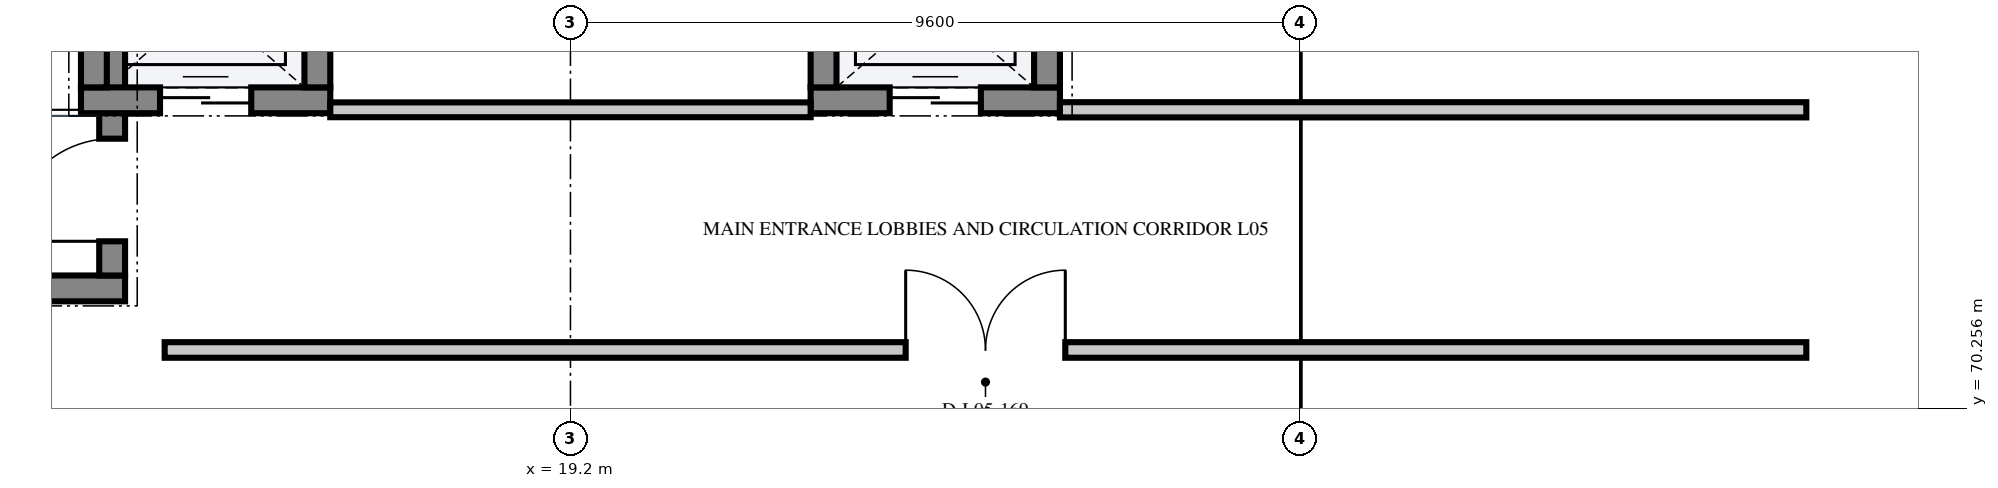
"""IFC4 building model, lengths in metres.
Left out: names, types, materials, properties, quantities, classifications, styles, units other than length and angle.
Written with IfcOpenShell. Run it as: python <this file> out.ifc"""

import sys

from ifc_helpers import new_model, si_unit, direction, frame, frame_2d, origin, place, context, subcontext, project, spatial, rectangle, extrude, element, fill, save


model = new_model("IFC4")
c1 = context("Model", 3, precision=1e-05, world=origin(), true_north=direction((0.0, 1.0)))
c2 = subcontext(c1, "Body", "Model", "MODEL_VIEW")
j1 = project(units=[si_unit("LENGTHUNIT", "METRE"), si_unit("PLANEANGLEUNIT", "RADIAN")], contexts=[c1])
p1 = place(None, origin())
s1 = spatial("IfcSite", under=j1, at=p1, CompositionType="ELEMENT")
p2 = place(p1, origin())
s2 = spatial("IfcBuilding", under=s1, at=p2, CompositionType="ELEMENT")
p3 = place(p2, frame((0.0, 0.0, 24.6)))
s3 = spatial("IfcBuildingStorey", under=s2, at=p3, CompositionType="ELEMENT", Elevation=24.6)
p4 = place(p3, frame((8.16, 71.83, 0.0), z_axis=(0.0, 0.0, 1.0), x_axis=(1.0, 0.0, 0.0)))
e1 = element("IfcWall", 1, at=p4, inside=s3, PredefinedType="SHEAR", context=c2, shape_type="SweptSolid", body=[
    extrude(rectangle(XDim=5.18, YDim=0.34, at=frame_2d((2.59, 0.0))), origin(), (0.0, 0.0, 1.0), 4.51),
])
p5 = place(p3, frame((13.17, 72.0, 0.0), z_axis=(0.0, 0.0, 1.0), x_axis=(0.0, 1.0, 0.0)))
e2 = element("IfcWall", 2, at=p5, inside=s3, PredefinedType="SHEAR", context=c2, shape_type="SweptSolid", body=[
    extrude(rectangle(XDim=8.8, YDim=0.34, at=frame_2d((4.4, 0.0))), origin(), (0.0, 0.0, 1.0), 4.51),
])
p6 = place(p5, frame((0.45, 0.0, 0.0)))
e3 = element("IfcOpeningElement", 3, at=p6, cuts=e2, PredefinedType="OPENING", context=c2, shape_type="SweptSolid", body=[
    extrude(rectangle(XDim=1.35, YDim=2.2, at=frame_2d((0.675, 1.1))), frame((0.0, 0.182, 0.0), z_axis=(0.0, -1.0, 0.0), x_axis=(1.0, 0.0, 0.0)), (0.0, 0.0, 1.0), 0.364),
])
p7 = place(p3, frame((12.76, 74.305, 0.0), z_axis=(0.0, 0.0, 1.0), x_axis=(1.0, 0.0, 0.0)))
e4 = element("IfcWall", 4, at=p7, inside=s3, PredefinedType="SHEAR", context=c2, shape_type="SweptSolid", body=[
    extrude(rectangle(XDim=3.28, YDim=0.34, at=frame_2d((1.64, 0.0))), origin(), (0.0, 0.0, 1.0), 4.51),
])
p8 = place(p7, frame((1.04, 0.0, 0.0)))
e5 = element("IfcOpeningElement", 5, at=p8, cuts=e4, PredefinedType="OPENING", context=c2, shape_type="SweptSolid", body=[
    extrude(rectangle(XDim=1.2, YDim=2.2, at=frame_2d((0.6, 1.1))), frame((0.0, 0.182, 0.0), z_axis=(0.0, -1.0, 0.0), x_axis=(1.0, 0.0, 0.0)), (0.0, 0.0, 1.0), 0.364),
])
for number, where, z_axis, x_axis in (
    (6, (12.93, 74.475, 0.0), (0.0, 0.0, 1.0), (0.0, 1.0, 0.0)),
    (7, (15.87, 74.475, 0.0), (0.0, 0.0, 1.0), (0.0, 1.0, 0.0)),
):
    element("IfcWall", number, at=place(p3, frame(where, z_axis=z_axis, x_axis=x_axis)), inside=s3, PredefinedType="SHEAR", context=c2, shape_type="SweptSolid", body=[
        extrude(rectangle(XDim=2.25, YDim=0.34, at=frame_2d((1.125, 0.0))), origin(), (0.0, 0.0, 1.0), 4.51),
    ])
p9 = place(p3, frame((22.36, 74.305, 0.0), z_axis=(0.0, 0.0, 1.0), x_axis=(1.0, 0.0, 0.0)))
e8 = element("IfcWall", 8, at=p9, inside=s3, PredefinedType="SHEAR", context=c2, shape_type="SweptSolid", body=[
    extrude(rectangle(XDim=3.28, YDim=0.34, at=frame_2d((1.64, 0.0))), origin(), (0.0, 0.0, 1.0), 4.51),
])
p10 = place(p9, frame((1.04, 0.0, 0.0)))
e9 = element("IfcOpeningElement", 9, at=p10, cuts=e8, PredefinedType="OPENING", context=c2, shape_type="SweptSolid", body=[
    extrude(rectangle(XDim=1.2, YDim=2.2, at=frame_2d((0.6, 1.1))), frame((0.0, 0.182, 0.0), z_axis=(0.0, -1.0, 0.0), x_axis=(1.0, 0.0, 0.0)), (0.0, 0.0, 1.0), 0.364),
])
for number, where, z_axis, x_axis in (
    (10, (22.53, 74.475, 0.0), (0.0, 0.0, 1.0), (0.0, 1.0, 0.0)),
    (11, (25.47, 74.475, 0.0), (0.0, 0.0, 1.0), (0.0, 1.0, 0.0)),
):
    element("IfcWall", number, at=place(p3, frame(where, z_axis=z_axis, x_axis=x_axis)), inside=s3, PredefinedType="SHEAR", context=c2, shape_type="SweptSolid", body=[
        extrude(rectangle(XDim=2.25, YDim=0.34, at=frame_2d((1.125, 0.0))), origin(), (0.0, 0.0, 1.0), 4.51),
    ])
p11 = place(p3, frame((13.861, 71.02, 0.0), z_axis=(0.0, 0.0, 1.0), x_axis=(1.0, 0.0, 0.0)))
e12 = element("IfcWall", 12, at=p11, inside=s3, PredefinedType="PARTITIONING", context=c2, shape_type="SweptSolid", body=[
    extrude(rectangle(XDim=21.599, YDim=0.205, at=frame_2d((10.799, 0.0))), origin(), (0.0, 0.0, 1.0), 4.51),
])
p12 = place(p11, frame((9.75, 0.0, 0.0)))
e13 = element("IfcOpeningElement", 13, at=p12, cuts=e12, PredefinedType="OPENING", context=c2, shape_type="SweptSolid", body=[
    extrude(rectangle(XDim=2.1, YDim=2.42, at=frame_2d((1.05, 1.21))), frame((0.0, 0.115, 0.0), z_axis=(0.0, -1.0, 0.0), x_axis=(1.0, 0.0, 0.0)), (0.0, 0.0, 1.0), 0.229),
])
p13 = place(p3, frame((35.46, 74.18, 0.0), z_axis=(0.0, 0.0, 1.0), x_axis=(-1.0, 0.0, 0.0)))
e14 = element("IfcWall", 14, at=p13, inside=s3, PredefinedType="PARTITIONING", context=c2, shape_type="SweptSolid", body=[
    extrude(rectangle(XDim=9.82, YDim=0.2, at=frame_2d((4.91, 0.0))), origin(), (0.0, 0.0, 1.0), 4.51),
])
p14 = place(p3, frame((22.36, 74.18, 0.0), z_axis=(0.0, 0.0, 1.0), x_axis=(-1.0, 0.0, 0.0)))
e15 = element("IfcWall", 15, at=p14, inside=s3, PredefinedType="PARTITIONING", context=c2, shape_type="SweptSolid", body=[
    extrude(rectangle(XDim=6.32, YDim=0.195, at=frame_2d((3.16, 0.0))), origin(), (0.0, 0.0, 1.0), 4.51),
])
p15 = place(p6, origin())
e16 = element("IfcDoor", 16, at=p15, inside=s3, OperationType="SINGLE_SWING_LEFT", PredefinedType="DOOR", context=c2, shape_type="SweptSolid", body=[
    extrude(rectangle(XDim=1.35, YDim=2.2, at=frame_2d((0.675, 1.1))), frame((0.0, 0.025, 0.0), z_axis=(0.0, -1.0, 0.0), x_axis=(1.0, 0.0, 0.0)), (0.0, 0.0, 1.0), 0.05),
])
fill(e3, e16)
p16 = place(p8, origin())
e17 = element("IfcDoor", 17, at=p16, inside=s3, OperationType="DOUBLE_DOOR_SLIDING", PredefinedType="DOOR", context=c2, shape_type="SweptSolid", body=[
    extrude(rectangle(XDim=1.2, YDim=2.2, at=frame_2d((0.6, 1.1))), frame((0.0, 0.025, 0.0), z_axis=(0.0, -1.0, 0.0), x_axis=(1.0, 0.0, 0.0)), (0.0, 0.0, 1.0), 0.05),
])
fill(e5, e17)
p17 = place(p10, origin())
e18 = element("IfcDoor", 18, at=p17, inside=s3, OperationType="DOUBLE_DOOR_SLIDING", PredefinedType="DOOR", context=c2, shape_type="SweptSolid", body=[
    extrude(rectangle(XDim=1.2, YDim=2.2, at=frame_2d((0.6, 1.1))), frame((0.0, 0.025, 0.0), z_axis=(0.0, -1.0, 0.0), x_axis=(1.0, 0.0, 0.0)), (0.0, 0.0, 1.0), 0.05),
])
fill(e9, e18)
p18 = place(p12, origin())
e19 = element("IfcDoor", 19, at=p18, inside=s3, OperationType="DOUBLE_DOOR_SINGLE_SWING", PredefinedType="DOOR", context=c2, shape_type="SweptSolid", body=[
    extrude(rectangle(XDim=2.1, YDim=2.42, at=frame_2d((1.05, 1.21))), frame((0.0, 0.025, 0.0), z_axis=(0.0, -1.0, 0.0), x_axis=(1.0, 0.0, 0.0)), (0.0, 0.0, 1.0), 0.05),
])
fill(e13, e19)
save(model, sys.argv[1])
